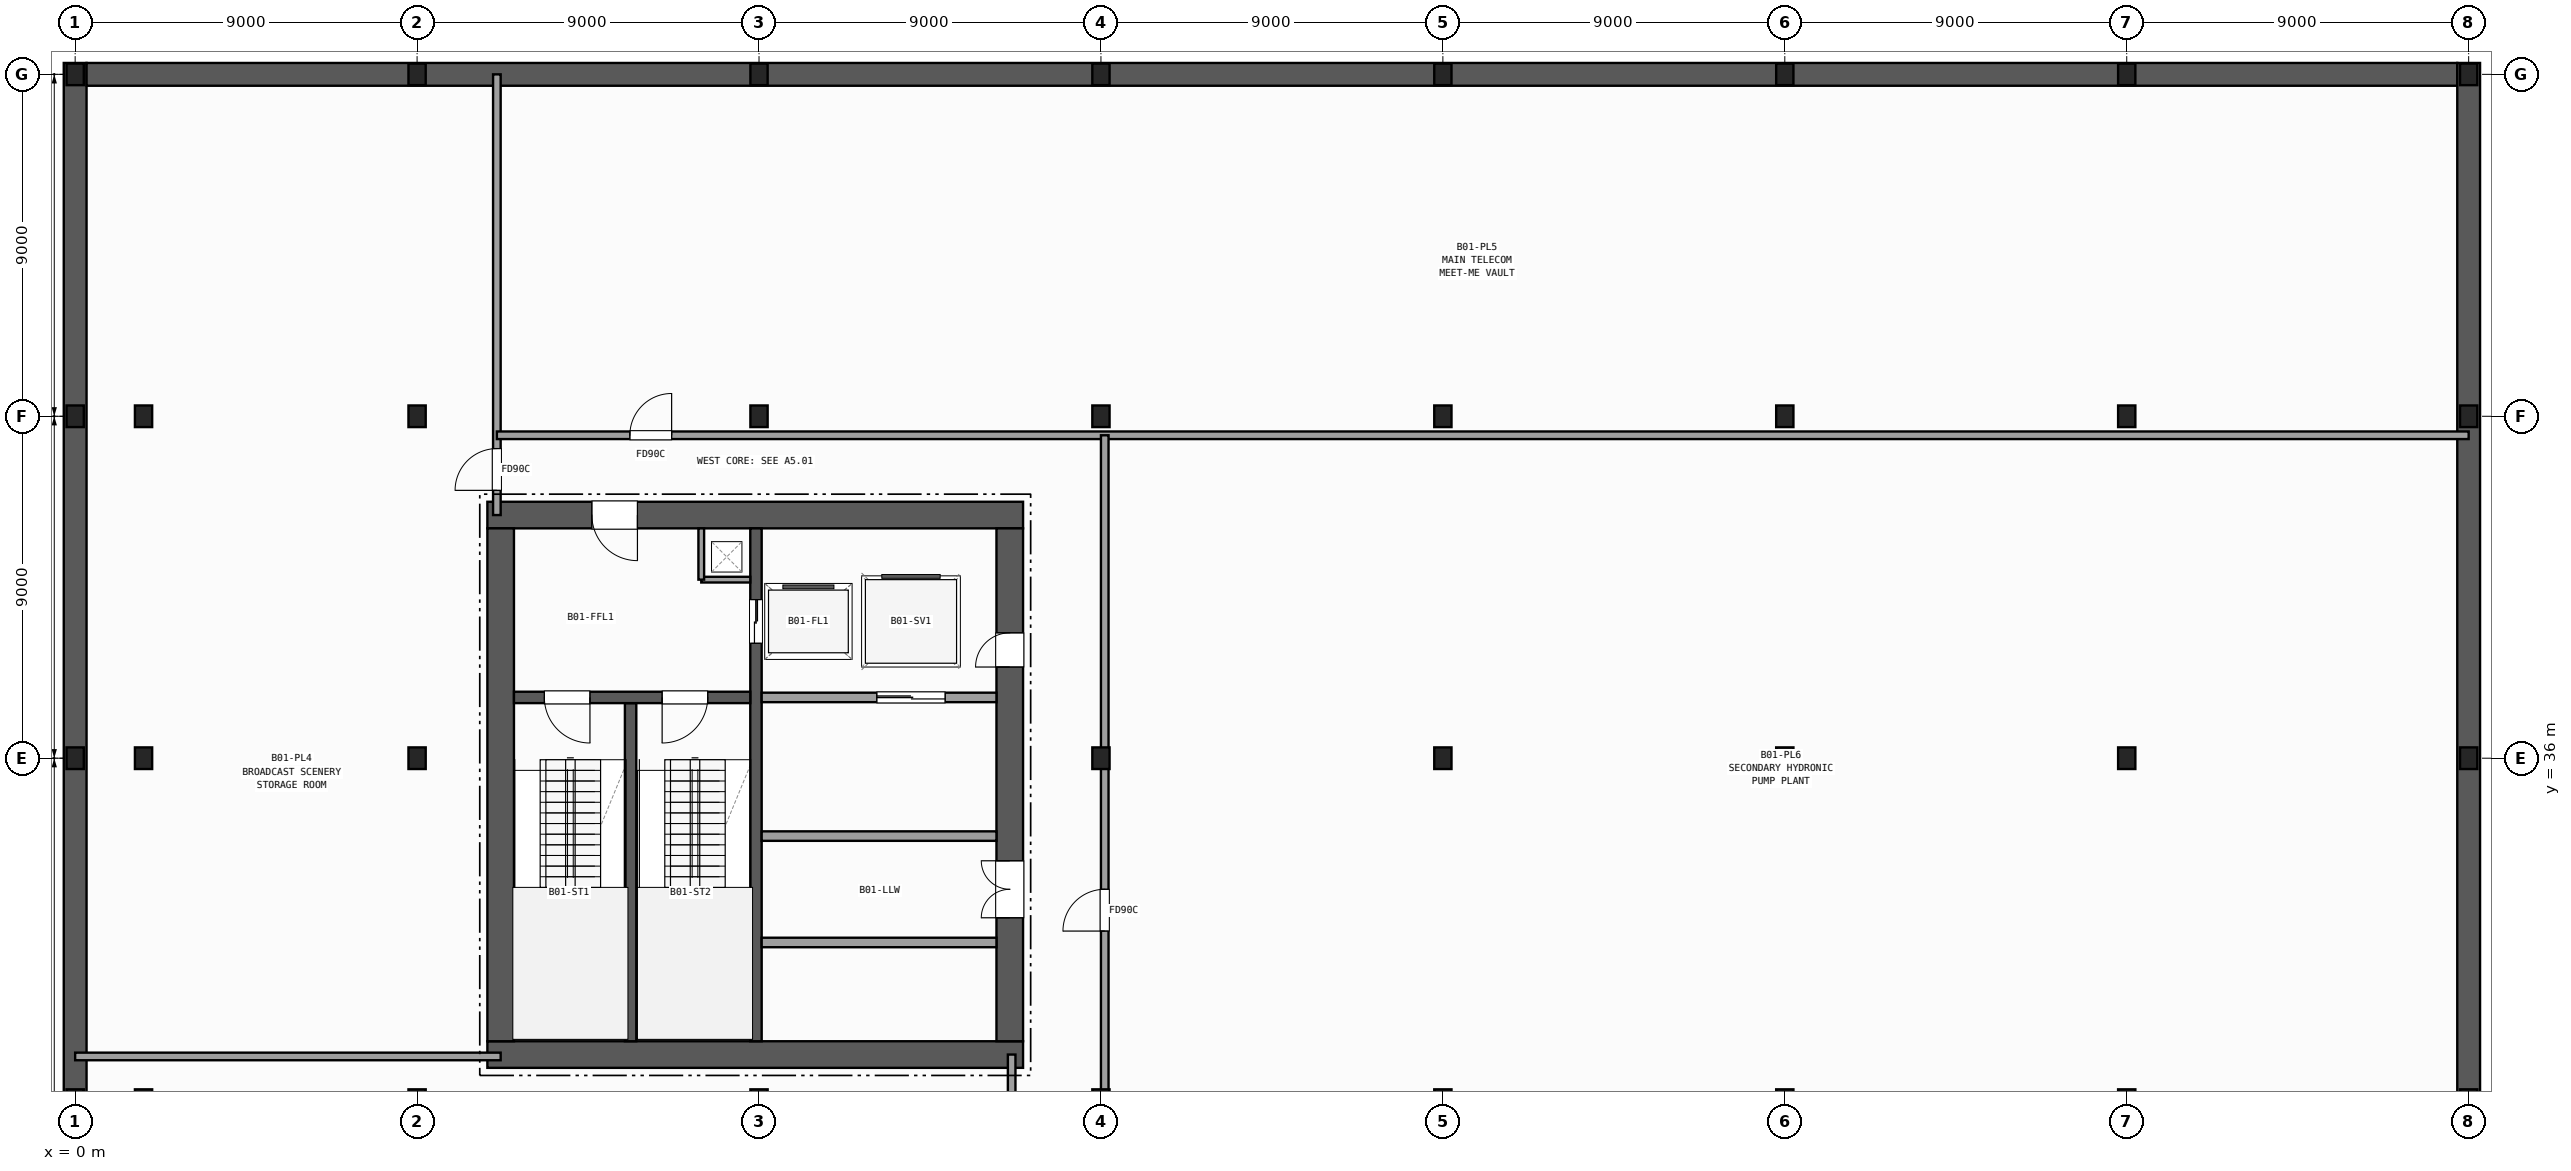
"""IFC4 building model, lengths in metres.
Left out: names, types, materials, properties, quantities, classifications, styles, units other than length and angle.
Written with IfcOpenShell. Run it as: python <this file> out.ifc"""

import sys

from ifc_helpers import new_model, si_unit, direction, frame, frame_2d, origin, origin_2d, place, context, subcontext, project, spatial, rectangle, i_section, extrude, element, fill, save


model = new_model("IFC4")
c1 = context("Model", 3, precision=1e-05, world=origin(), true_north=direction((0.0, 1.0)))
c2 = subcontext(c1, "Body", "Model", "MODEL_VIEW")
j1 = project(units=[si_unit("LENGTHUNIT", "METRE"), si_unit("PLANEANGLEUNIT", "RADIAN")], contexts=[c1])
p1 = place(None, origin())
s1 = spatial("IfcSite", under=j1, at=p1, CompositionType="ELEMENT")
p2 = place(p1, origin())
s2 = spatial("IfcBuilding", under=s1, at=p2, CompositionType="ELEMENT")
p3 = place(p2, frame((0.0, 0.0, -4.5)))
s3 = spatial("IfcBuildingStorey", under=s2, at=p3, CompositionType="ELEMENT", Elevation=-4.5)
for number, where, z_axis, x_axis in (
    (1, (0.0, 27.0, 0.0), (0.0, 0.0, 1.0), (1.0, 0.0, 0.0)),
    (2, (0.0, 36.0, 0.0), (0.0, 0.0, 1.0), (1.0, 0.0, 0.0)),
    (3, (0.0, 45.0, 0.0), (0.0, 0.0, 1.0), (1.0, 0.0, 0.0)),
    (4, (0.0, 54.0, 0.0), (0.0, 0.0, 1.0), (1.0, 0.0, 0.0)),
    (5, (9.0, 27.0, 0.0), (0.0, 0.0, 1.0), (1.0, 0.0, 0.0)),
    (6, (9.0, 36.0, 0.0), (0.0, 0.0, 1.0), (1.0, 0.0, 0.0)),
    (7, (9.0, 45.0, 0.0), (0.0, 0.0, 1.0), (1.0, 0.0, 0.0)),
    (8, (9.0, 54.0, 0.0), (0.0, 0.0, 1.0), (1.0, 0.0, 0.0)),
    (9, (18.0, 27.0, 0.0), (0.0, 0.0, 1.0), (1.0, 0.0, 0.0)),
    (10, (18.0, 45.0, 0.0), (0.0, 0.0, 1.0), (1.0, 0.0, 0.0)),
    (11, (18.0, 54.0, 0.0), (0.0, 0.0, 1.0), (1.0, 0.0, 0.0)),
    (12, (27.0, 27.0, 0.0), (0.0, 0.0, 1.0), (1.0, 0.0, 0.0)),
    (13, (27.0, 36.0, 0.0), (0.0, 0.0, 1.0), (1.0, 0.0, 0.0)),
    (14, (27.0, 45.0, 0.0), (0.0, 0.0, 1.0), (1.0, 0.0, 0.0)),
    (15, (27.0, 54.0, 0.0), (0.0, 0.0, 1.0), (1.0, 0.0, 0.0)),
    (16, (36.0, 27.0, 0.0), (0.0, 0.0, 1.0), (1.0, 0.0, 0.0)),
    (17, (36.0, 36.0, 0.0), (0.0, 0.0, 1.0), (1.0, 0.0, 0.0)),
    (18, (36.0, 45.0, 0.0), (0.0, 0.0, 1.0), (1.0, 0.0, 0.0)),
    (19, (36.0, 54.0, 0.0), (0.0, 0.0, 1.0), (1.0, 0.0, 0.0)),
    (20, (45.0, 27.0, 0.0), (0.0, 0.0, 1.0), (1.0, 0.0, 0.0)),
    (21, (45.0, 36.0, 0.0), (0.0, 0.0, 1.0), (1.0, 0.0, 0.0)),
    (22, (45.0, 45.0, 0.0), (0.0, 0.0, 1.0), (1.0, 0.0, 0.0)),
    (23, (45.0, 54.0, 0.0), (0.0, 0.0, 1.0), (1.0, 0.0, 0.0)),
    (24, (54.0, 27.0, 0.0), (0.0, 0.0, 1.0), (1.0, 0.0, 0.0)),
    (25, (54.0, 36.0, 0.0), (0.0, 0.0, 1.0), (1.0, 0.0, 0.0)),
    (26, (54.0, 45.0, 0.0), (0.0, 0.0, 1.0), (1.0, 0.0, 0.0)),
    (27, (54.0, 54.0, 0.0), (0.0, 0.0, 1.0), (1.0, 0.0, 0.0)),
    (28, (63.0, 27.0, 0.0), (0.0, 0.0, 1.0), (1.0, 0.0, 0.0)),
    (29, (63.0, 36.0, 0.0), (0.0, 0.0, 1.0), (1.0, 0.0, 0.0)),
    (30, (63.0, 45.0, 0.0), (0.0, 0.0, 1.0), (1.0, 0.0, 0.0)),
    (31, (63.0, 54.0, 0.0), (0.0, 0.0, 1.0), (1.0, 0.0, 0.0)),
    (32, (1.8, 27.0, 0.0), (0.0, 0.0, 1.0), (1.0, 0.0, 0.0)),
    (33, (1.8, 36.0, 0.0), (0.0, 0.0, 1.0), (1.0, 0.0, 0.0)),
    (34, (1.8, 45.0, 0.0), (0.0, 0.0, 1.0), (1.0, 0.0, 0.0)),
):
    element("IfcColumn", number, at=place(p3, frame(where, z_axis=z_axis, x_axis=x_axis)), inside=s3, PredefinedType="COLUMN", context=c2, shape_type="SweptSolid", body=[
        extrude(i_section(OverallWidth=0.454, OverallDepth=0.569, WebThickness=0.078, FlangeThickness=0.125, FilletRadius=0.015, at=origin_2d()), origin(), (0.0, 0.0, 1.0), 4.5),
    ])
p4 = place(p3, frame((0.0, -0.3, 0.0), z_axis=(0.0, 0.0, 1.0), x_axis=(0.0, 1.0, 0.0)))
e35 = element("IfcWall", 35, at=p4, inside=s3, PredefinedType="SOLIDWALL", context=c2, shape_type="SweptSolid", body=[
    extrude(rectangle(XDim=54.6, YDim=0.6, at=frame_2d((27.3, 0.0))), origin(), (0.0, 0.0, 1.0), 4.18),
])
p5 = place(p3, frame((0.3, 54.0, 0.0), z_axis=(0.0, 0.0, 1.0), x_axis=(1.0, 0.0, 0.0)))
e36 = element("IfcWall", 36, at=p5, inside=s3, PredefinedType="SOLIDWALL", context=c2, shape_type="SweptSolid", body=[
    extrude(rectangle(XDim=62.4, YDim=0.6, at=frame_2d((31.2, 0.0))), origin(), (0.0, 0.0, 1.0), 4.18),
])
p6 = place(p3, frame((63.0, 54.3, 0.0), z_axis=(0.0, 0.0, 1.0), x_axis=(0.0, -1.0, 0.0)))
e37 = element("IfcWall", 37, at=p6, inside=s3, PredefinedType="SOLIDWALL", context=c2, shape_type="SweptSolid", body=[
    extrude(rectangle(XDim=54.6, YDim=0.6, at=frame_2d((27.3, 0.0))), origin(), (0.0, 0.0, 1.0), 4.18),
])
p7 = place(p3, frame((10.85, 28.2, 0.0), z_axis=(0.0, 0.0, 1.0), x_axis=(1.0, 0.0, 0.0)))
e38 = element("IfcWall", 38, at=p7, inside=s3, PredefinedType="SHEAR", context=c2, shape_type="SweptSolid", body=[
    extrude(rectangle(XDim=14.1, YDim=0.7, at=frame_2d((7.05, 0.0))), origin(), (0.0, 0.0, 1.0), 4.18),
])
p8 = place(p3, frame((24.95, 42.4, 0.0), z_axis=(0.0, 0.0, 1.0), x_axis=(-1.0, 0.0, 0.0)))
e39 = element("IfcWall", 39, at=p8, inside=s3, PredefinedType="SHEAR", context=c2, shape_type="SweptSolid", body=[
    extrude(rectangle(XDim=14.1, YDim=0.7, at=frame_2d((7.05, 0.0))), origin(), (0.0, 0.0, 1.0), 4.18),
])
p9 = place(p8, frame((10.15, 0.0, 0.0)))
e40 = element("IfcOpeningElement", 40, at=p9, cuts=e39, PredefinedType="OPENING", context=c2, shape_type="SweptSolid", body=[
    extrude(rectangle(XDim=1.2, YDim=2.15, at=frame_2d((0.6, 1.075))), frame((0.0, 0.36, 0.0), z_axis=(0.0, -1.0, 0.0), x_axis=(1.0, 0.0, 0.0)), (0.0, 0.0, 1.0), 0.72),
])
p10 = place(p3, frame((11.2, 42.05, 0.0), z_axis=(0.0, 0.0, 1.0), x_axis=(0.0, -1.0, 0.0)))
e41 = element("IfcWall", 41, at=p10, inside=s3, PredefinedType="SHEAR", context=c2, shape_type="SweptSolid", body=[
    extrude(rectangle(XDim=13.5, YDim=0.7, at=frame_2d((6.75, 0.0))), origin(), (0.0, 0.0, 1.0), 4.18),
])
p11 = place(p3, frame((24.6, 28.55, 0.0), z_axis=(0.0, 0.0, 1.0), x_axis=(0.0, 1.0, 0.0)))
e42 = element("IfcWall", 42, at=p11, inside=s3, PredefinedType="SHEAR", context=c2, shape_type="SweptSolid", body=[
    extrude(rectangle(XDim=13.5, YDim=0.7, at=frame_2d((6.75, 0.0))), origin(), (0.0, 0.0, 1.0), 4.18),
])
p12 = place(p11, frame((3.25, 0.0, 0.0)))
e43 = element("IfcOpeningElement", 43, at=p12, cuts=e42, PredefinedType="OPENING", context=c2, shape_type="SweptSolid", body=[
    extrude(rectangle(XDim=1.5, YDim=2.2, at=frame_2d((0.75, 1.1))), frame((0.0, 0.36, 0.0), z_axis=(0.0, -1.0, 0.0), x_axis=(1.0, 0.0, 0.0)), (0.0, 0.0, 1.0), 0.72),
])
p13 = place(p11, frame((9.85, 0.0, 0.0)))
e44 = element("IfcOpeningElement", 44, at=p13, cuts=e42, PredefinedType="OPENING", context=c2, shape_type="SweptSolid", body=[
    extrude(rectangle(XDim=0.9, YDim=2.1, at=frame_2d((0.45, 1.05))), frame((0.0, 0.36, 0.0), z_axis=(0.0, -1.0, 0.0), x_axis=(1.0, 0.0, 0.0)), (0.0, 0.0, 1.0), 0.72),
])
p14 = place(p3, frame((14.62, 28.55, 0.0), z_axis=(0.0, 0.0, 1.0), x_axis=(0.0, 1.0, 0.0)))
e45 = element("IfcWall", 45, at=p14, inside=s3, PredefinedType="SHEAR", context=c2, shape_type="SweptSolid", body=[
    extrude(rectangle(XDim=8.9, YDim=0.3, at=frame_2d((4.45, 0.0))), origin(), (0.0, 0.0, 1.0), 4.18),
])
p15 = place(p3, frame((17.92, 42.05, 0.0), z_axis=(0.0, 0.0, 1.0), x_axis=(0.0, -1.0, 0.0)))
e46 = element("IfcWall", 46, at=p15, inside=s3, PredefinedType="SHEAR", context=c2, shape_type="SweptSolid", body=[
    extrude(rectangle(XDim=13.5, YDim=0.3, at=frame_2d((6.75, 0.0))), origin(), (0.0, 0.0, 1.0), 4.18),
])
p16 = place(p15, frame((1.875, 0.0, 0.0)))
e47 = element("IfcOpeningElement", 47, at=p16, cuts=e46, PredefinedType="OPENING", context=c2, shape_type="SweptSolid", body=[
    extrude(rectangle(XDim=1.15, YDim=2.15, at=frame_2d((0.575, 1.075))), frame((0.0, 0.16, 0.0), z_axis=(0.0, -1.0, 0.0), x_axis=(1.0, 0.0, 0.0)), (0.0, 0.0, 1.0), 0.32),
])
p17 = place(p3, frame((17.77, 37.6, 0.0), z_axis=(0.0, 0.0, 1.0), x_axis=(-1.0, 0.0, 0.0)))
e48 = element("IfcWall", 48, at=p17, inside=s3, PredefinedType="SHEAR", context=c2, shape_type="SweptSolid", body=[
    extrude(rectangle(XDim=6.22, YDim=0.3, at=frame_2d((3.11, 0.0))), origin(), (0.0, 0.0, 1.0), 4.18),
])
p18 = place(p17, frame((4.22, 0.0, 0.0)))
e49 = element("IfcOpeningElement", 49, at=p18, cuts=e48, PredefinedType="OPENING", context=c2, shape_type="SweptSolid", body=[
    extrude(rectangle(XDim=1.2, YDim=2.15, at=frame_2d((0.6, 1.075))), frame((0.0, 0.16, 0.0), z_axis=(0.0, -1.0, 0.0), x_axis=(1.0, 0.0, 0.0)), (0.0, 0.0, 1.0), 0.32),
])
p19 = place(p17, frame((1.12, 0.0, 0.0)))
e50 = element("IfcOpeningElement", 50, at=p19, cuts=e48, PredefinedType="OPENING", context=c2, shape_type="SweptSolid", body=[
    extrude(rectangle(XDim=1.2, YDim=2.15, at=frame_2d((0.6, 1.075))), frame((0.0, 0.16, 0.0), z_axis=(0.0, -1.0, 0.0), x_axis=(1.0, 0.0, 0.0)), (0.0, 0.0, 1.0), 0.32),
])
p20 = place(p3, frame((16.48, 40.7, 0.0), z_axis=(0.0, 0.0, 1.0), x_axis=(1.0, 0.0, 0.0)))
e51 = element("IfcWall", 51, at=p20, inside=s3, PredefinedType="PARTITIONING", context=c2, shape_type="SweptSolid", body=[
    extrude(rectangle(XDim=1.29, YDim=0.15, at=frame_2d((0.645, 0.0))), origin(), (0.0, 0.0, 1.0), 4.18),
])
p21 = place(p3, frame((16.48, 40.7, 0.0), z_axis=(0.0, 0.0, 1.0), x_axis=(0.0, 1.0, 0.0)))
e52 = element("IfcWall", 52, at=p21, inside=s3, PredefinedType="PARTITIONING", context=c2, shape_type="SweptSolid", body=[
    extrude(rectangle(XDim=1.35, YDim=0.15, at=frame_2d((0.675, 0.0))), origin(), (0.0, 0.0, 1.0), 4.18),
])
p22 = place(p3, frame((18.07, 37.6, 0.0), z_axis=(0.0, 0.0, 1.0), x_axis=(1.0, 0.0, 0.0)))
e53 = element("IfcWall", 53, at=p22, inside=s3, PredefinedType="PARTITIONING", context=c2, shape_type="SweptSolid", body=[
    extrude(rectangle(XDim=6.18, YDim=0.25, at=frame_2d((3.09, 0.0))), origin(), (0.0, 0.0, 1.0), 4.18),
])
p23 = place(p22, frame((3.03, 0.0, 0.0)))
e54 = element("IfcOpeningElement", 54, at=p23, cuts=e53, PredefinedType="OPENING", context=c2, shape_type="SweptSolid", body=[
    extrude(rectangle(XDim=1.8, YDim=2.3, at=frame_2d((0.9, 1.15))), frame((0.0, 0.135, 0.0), z_axis=(0.0, -1.0, 0.0), x_axis=(1.0, 0.0, 0.0)), (0.0, 0.0, 1.0), 0.27),
])
for number, where, z_axis, x_axis in (
    (55, (18.07, 31.15, 0.0), (0.0, 0.0, 1.0), (1.0, 0.0, 0.0)),
    (56, (24.25, 33.95, 0.0), (0.0, 0.0, 1.0), (-1.0, 0.0, 0.0)),
):
    element("IfcWall", number, at=place(p3, frame(where, z_axis=z_axis, x_axis=x_axis)), inside=s3, PredefinedType="PARTITIONING", context=c2, shape_type="SweptSolid", body=[
        extrude(rectangle(XDim=6.18, YDim=0.25, at=frame_2d((3.09, 0.0))), origin(), (0.0, 0.0, 1.0), 4.18),
    ])
p24 = place(p3, frame((24.65, 0.0, 0.0), z_axis=(0.0, 0.0, 1.0), x_axis=(0.0, 1.0, 0.0)))
e57 = element("IfcWall", 57, at=p24, inside=s3, PredefinedType="PARTITIONING", context=c2, shape_type="SweptSolid", body=[
    extrude(rectangle(XDim=28.2, YDim=0.2, at=frame_2d((14.1, 0.0))), origin(), (0.0, 0.0, 1.0), 3.233),
])
p25 = place(p24, frame((13.0, 0.0, 0.0)))
e58 = element("IfcOpeningElement", 58, at=p25, cuts=e57, PredefinedType="OPENING", context=c2, shape_type="SweptSolid", body=[
    extrude(rectangle(XDim=1.1, YDim=2.15, at=frame_2d((0.55, 1.075))), frame((0.0, 0.11, 0.0), z_axis=(0.0, -1.0, 0.0), x_axis=(1.0, 0.0, 0.0)), (0.0, 0.0, 1.0), 0.22),
])
p26 = place(p3, frame((0.0, 28.15, 0.0), z_axis=(0.0, 0.0, 1.0), x_axis=(1.0, 0.0, 0.0)))
e59 = element("IfcWall", 59, at=p26, inside=s3, PredefinedType="PARTITIONING", context=c2, shape_type="SweptSolid", body=[
    extrude(rectangle(XDim=11.2, YDim=0.2, at=frame_2d((5.6, 0.0))), origin(), (0.0, 0.0, 1.0), 3.305),
])
p27 = place(p3, frame((11.1, 42.4, 0.0), z_axis=(0.0, 0.0, 1.0), x_axis=(0.0, 1.0, 0.0)))
e60 = element("IfcWall", 60, at=p27, inside=s3, PredefinedType="PARTITIONING", context=c2, shape_type="SweptSolid", body=[
    extrude(rectangle(XDim=11.6, YDim=0.2, at=frame_2d((5.8, 0.0))), origin(), (0.0, 0.0, 1.0), 3.233),
])
p28 = place(p27, frame((0.65, 0.0, 0.0)))
e61 = element("IfcOpeningElement", 61, at=p28, cuts=e60, PredefinedType="OPENING", context=c2, shape_type="SweptSolid", body=[
    extrude(rectangle(XDim=1.1, YDim=2.15, at=frame_2d((0.55, 1.075))), frame((0.0, 0.11, 0.0), z_axis=(0.0, -1.0, 0.0), x_axis=(1.0, 0.0, 0.0)), (0.0, 0.0, 1.0), 0.22),
])
p29 = place(p3, frame((11.1, 44.5, 0.0), z_axis=(0.0, 0.0, 1.0), x_axis=(1.0, 0.0, 0.0)))
e62 = element("IfcWall", 62, at=p29, inside=s3, PredefinedType="PARTITIONING", context=c2, shape_type="SweptSolid", body=[
    extrude(rectangle(XDim=51.9, YDim=0.2, at=frame_2d((25.95, 0.0))), origin(), (0.0, 0.0, 1.0), 3.305),
])
p30 = place(p29, frame((3.5, 0.0, 0.0)))
e63 = element("IfcOpeningElement", 63, at=p30, cuts=e62, PredefinedType="OPENING", context=c2, shape_type="SweptSolid", body=[
    extrude(rectangle(XDim=1.1, YDim=2.15, at=frame_2d((0.55, 1.075))), frame((0.0, 0.11, 0.0), z_axis=(0.0, -1.0, 0.0), x_axis=(1.0, 0.0, 0.0)), (0.0, 0.0, 1.0), 0.22),
])
p31 = place(p3, frame((27.1, 26.95, 0.0), z_axis=(0.0, 0.0, 1.0), x_axis=(0.0, 1.0, 0.0)))
e64 = element("IfcWall", 64, at=p31, inside=s3, PredefinedType="PARTITIONING", context=c2, shape_type="SweptSolid", body=[
    extrude(rectangle(XDim=17.55, YDim=0.2, at=frame_2d((8.775, 0.0))), origin(), (0.0, 0.0, 1.0), 3.233),
])
p32 = place(p31, frame((4.5, 0.0, 0.0)))
e65 = element("IfcOpeningElement", 65, at=p32, cuts=e64, PredefinedType="OPENING", context=c2, shape_type="SweptSolid", body=[
    extrude(rectangle(XDim=1.1, YDim=2.15, at=frame_2d((0.55, 1.075))), frame((0.0, 0.11, 0.0), z_axis=(0.0, -1.0, 0.0), x_axis=(1.0, 0.0, 0.0)), (0.0, 0.0, 1.0), 0.22),
])
p33 = place(p18, origin())
e66 = element("IfcDoor", 66, at=p33, inside=s3, OperationType="SINGLE_SWING_LEFT", PredefinedType="DOOR", context=c2, shape_type="SweptSolid", body=[
    extrude(rectangle(XDim=1.2, YDim=2.15, at=frame_2d((0.6, 1.075))), frame((0.0, 0.025, 0.0), z_axis=(0.0, -1.0, 0.0), x_axis=(1.0, 0.0, 0.0)), (0.0, 0.0, 1.0), 0.05),
])
fill(e49, e66)
p34 = place(p19, origin())
e67 = element("IfcDoor", 67, at=p34, inside=s3, OperationType="SINGLE_SWING_RIGHT", PredefinedType="DOOR", context=c2, shape_type="SweptSolid", body=[
    extrude(rectangle(XDim=1.2, YDim=2.15, at=frame_2d((0.6, 1.075))), frame((0.0, 0.025, 0.0), z_axis=(0.0, -1.0, 0.0), x_axis=(1.0, 0.0, 0.0)), (0.0, 0.0, 1.0), 0.05),
])
fill(e50, e67)
p35 = place(p12, origin())
e68 = element("IfcDoor", 68, at=p35, inside=s3, OperationType="DOUBLE_DOOR_SINGLE_SWING", PredefinedType="DOOR", context=c2, shape_type="SweptSolid", body=[
    extrude(rectangle(XDim=1.5, YDim=2.2, at=frame_2d((0.75, 1.1))), frame((0.0, 0.025, 0.0), z_axis=(0.0, -1.0, 0.0), x_axis=(1.0, 0.0, 0.0)), (0.0, 0.0, 1.0), 0.05),
])
fill(e43, e68)
p36 = place(p9, origin())
e69 = element("IfcDoor", 69, at=p36, inside=s3, OperationType="SINGLE_SWING_LEFT", PredefinedType="DOOR", context=c2, shape_type="SweptSolid", body=[
    extrude(rectangle(XDim=1.2, YDim=2.15, at=frame_2d((0.6, 1.075))), frame((0.0, 0.025, 0.0), z_axis=(0.0, -1.0, 0.0), x_axis=(1.0, 0.0, 0.0)), (0.0, 0.0, 1.0), 0.05),
])
fill(e40, e69)
p37 = place(p13, origin())
e70 = element("IfcDoor", 70, at=p37, inside=s3, OperationType="SINGLE_SWING_LEFT", PredefinedType="DOOR", context=c2, shape_type="SweptSolid", body=[
    extrude(rectangle(XDim=0.9, YDim=2.1, at=frame_2d((0.45, 1.05))), frame((0.0, 0.025, 0.0), z_axis=(0.0, -1.0, 0.0), x_axis=(1.0, 0.0, 0.0)), (0.0, 0.0, 1.0), 0.05),
])
fill(e44, e70)
p38 = place(p16, origin())
e71 = element("IfcDoor", 71, at=p38, inside=s3, OperationType="DOUBLE_DOOR_SLIDING", PredefinedType="DOOR", context=c2, shape_type="SweptSolid", body=[
    extrude(rectangle(XDim=1.15, YDim=2.15, at=frame_2d((0.575, 1.075))), frame((0.0, 0.025, 0.0), z_axis=(0.0, -1.0, 0.0), x_axis=(1.0, 0.0, 0.0)), (0.0, 0.0, 1.0), 0.05),
])
fill(e47, e71)
p39 = place(p23, origin())
e72 = element("IfcDoor", 72, at=p39, inside=s3, OperationType="DOUBLE_DOOR_SLIDING", PredefinedType="DOOR", context=c2, shape_type="SweptSolid", body=[
    extrude(rectangle(XDim=1.8, YDim=2.3, at=frame_2d((0.9, 1.15))), frame((0.0, 0.025, 0.0), z_axis=(0.0, -1.0, 0.0), x_axis=(1.0, 0.0, 0.0)), (0.0, 0.0, 1.0), 0.05),
])
fill(e54, e72)
p40 = place(p28, origin())
e73 = element("IfcDoor", 73, at=p40, inside=s3, OperationType="SINGLE_SWING_LEFT", PredefinedType="DOOR", context=c2, shape_type="SweptSolid", body=[
    extrude(rectangle(XDim=1.1, YDim=2.15, at=frame_2d((0.55, 1.075))), frame((0.0, 0.025, 0.0), z_axis=(0.0, -1.0, 0.0), x_axis=(1.0, 0.0, 0.0)), (0.0, 0.0, 1.0), 0.05),
])
fill(e61, e73)
p41 = place(p30, origin())
e74 = element("IfcDoor", 74, at=p41, inside=s3, OperationType="SINGLE_SWING_RIGHT", PredefinedType="DOOR", context=c2, shape_type="SweptSolid", body=[
    extrude(rectangle(XDim=1.1, YDim=2.15, at=frame_2d((0.55, 1.075))), frame((0.0, 0.025, 0.0), z_axis=(0.0, -1.0, 0.0), x_axis=(1.0, 0.0, 0.0)), (0.0, 0.0, 1.0), 0.05),
])
fill(e63, e74)
p42 = place(p32, origin())
e75 = element("IfcDoor", 75, at=p42, inside=s3, OperationType="SINGLE_SWING_LEFT", PredefinedType="DOOR", context=c2, shape_type="SweptSolid", body=[
    extrude(rectangle(XDim=1.1, YDim=2.15, at=frame_2d((0.55, 1.075))), frame((0.0, 0.025, 0.0), z_axis=(0.0, -1.0, 0.0), x_axis=(1.0, 0.0, 0.0)), (0.0, 0.0, 1.0), 0.05),
])
fill(e65, e75)
save(model, sys.argv[1])
